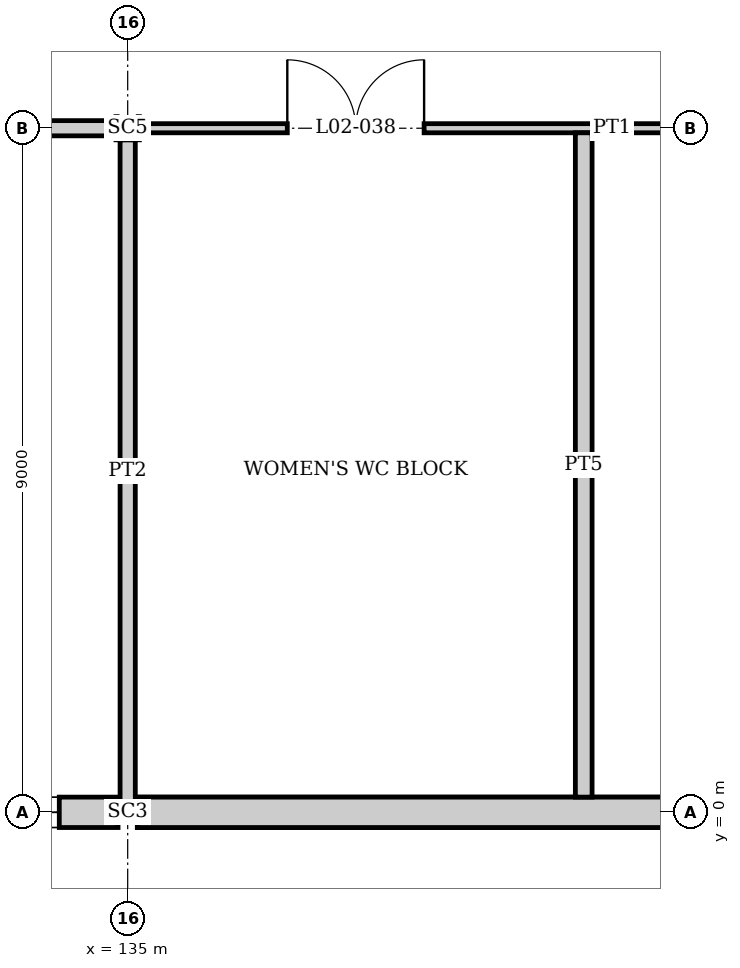
"""IFC4 building model, lengths in metres.
Left out: names, types, materials, properties, quantities, classifications, styles, units other than length and angle.
Written with IfcOpenShell. Run it as: python <this file> out.ifc"""

import sys

from ifc_helpers import new_model, si_unit, direction, frame, frame_2d, origin, origin_2d, place, context, subcontext, project, spatial, polyline, rectangle, i_section, outline, extrude, element, fill, save


model = new_model("IFC4")
c1 = context("Model", 3, precision=1e-05, world=origin(), true_north=direction((0.0, 1.0)))
c2 = subcontext(c1, "Body", "Model", "MODEL_VIEW")
j1 = project(units=[si_unit("LENGTHUNIT", "METRE"), si_unit("PLANEANGLEUNIT", "RADIAN")], contexts=[c1])
p1 = place(None, origin())
s1 = spatial("IfcSite", under=j1, at=p1, CompositionType="ELEMENT")
p2 = place(p1, origin())
s2 = spatial("IfcBuilding", under=s1, at=p2, CompositionType="ELEMENT")
p3 = place(p2, frame((0.0, 0.0, 10.5)))
s3 = spatial("IfcBuildingStorey", under=s2, at=p3, CompositionType="ELEMENT", Elevation=10.5)
p4 = place(p3, frame((135.0, 0.0, 0.0), z_axis=(0.0, 0.0, 1.0), x_axis=(0.0, 1.0, 0.0)))
e1 = element("IfcColumn", 1, at=p4, inside=s3, PredefinedType="COLUMN", context=c2, shape_type="SweptSolid", body=[
    extrude(i_section(OverallWidth=0.254, OverallDepth=0.254, WebThickness=0.009, FlangeThickness=0.014, at=origin_2d()), origin(), (0.0, 0.0, 1.0), 4.5),
])
p5 = place(p3, frame((135.0, 9.0, 0.0), z_axis=(0.0, 0.0, 1.0), x_axis=(0.0, 1.0, 0.0)))
e2 = element("IfcColumn", 2, at=p5, inside=s3, PredefinedType="COLUMN", context=c2, shape_type="SweptSolid", body=[
    extrude(i_section(OverallWidth=0.305, OverallDepth=0.308, WebThickness=0.01, FlangeThickness=0.015, at=origin_2d()), origin(), (0.0, 0.0, 1.0), 4.5),
])
p6 = place(p3, frame((126.0, 0.0, 0.0), z_axis=(0.0, 0.0, 1.0), x_axis=(1.0, 0.0, 0.0)))
e3 = element("IfcWall", 3, at=p6, inside=s3, PredefinedType="SOLIDWALL", context=c2, shape_type="SweptSolid", body=[
    extrude(rectangle(XDim=8.873, YDim=0.4, at=frame_2d((4.437, 0.0))), origin(), (0.0, 0.0, 1.0), 3.991),
])
p7 = place(p6, frame((0.9, 0.0, 1.5)))
e4 = element("IfcOpeningElement", 4, at=p7, cuts=e3, PredefinedType="OPENING", context=c2, shape_type="SweptSolid", body=[
    extrude(rectangle(XDim=2.7, YDim=1.5, at=frame_2d((1.35, 0.75))), frame((0.0, 0.21, 0.0), z_axis=(0.0, -1.0, 0.0), x_axis=(1.0, 0.0, 0.0)), (0.0, 0.0, 1.0), 0.42),
])
p8 = place(p6, frame((5.4, 0.0, 1.5)))
e5 = element("IfcOpeningElement", 5, at=p8, cuts=e3, PredefinedType="OPENING", context=c2, shape_type="SweptSolid", body=[
    extrude(rectangle(XDim=2.7, YDim=1.5, at=frame_2d((1.35, 0.75))), frame((0.0, 0.21, 0.0), z_axis=(0.0, -1.0, 0.0), x_axis=(1.0, 0.0, 0.0)), (0.0, 0.0, 1.0), 0.42),
])
p9 = place(p3, frame((135.127, 0.0, 0.0), z_axis=(0.0, 0.0, 1.0), x_axis=(1.0, 0.0, 0.0)))
e6 = element("IfcWall", 6, at=p9, inside=s3, PredefinedType="SOLIDWALL", context=c2, shape_type="SweptSolid", body=[
    extrude(outline(polyline([(8.746, 0.0), (0.0, 0.0), (0.0, 3.86), (8.698, 0.38), (8.746, 0.5), (8.746, 0.0)])), frame((0.0, 0.2, 0.0), z_axis=(0.0, -1.0, 0.0), x_axis=(1.0, 0.0, 0.0)), (0.0, 0.0, 1.0), 0.4),
])
p10 = place(p3, frame((135.127, 0.0, 0.0), z_axis=(0.0, 0.0, 1.0), x_axis=(1.0, 0.0, 0.0)))
e7 = element("IfcWall", 7, at=p10, inside=s3, PredefinedType="SOLIDWALL", context=c2, shape_type="SweptSolid", body=[
    extrude(outline(polyline([(8.746, 3.991), (8.746, 0.64), (0.371, 3.991), (8.746, 3.991)])), frame((0.0, 0.2, 0.0), z_axis=(0.0, -1.0, 0.0), x_axis=(1.0, 0.0, 0.0)), (0.0, 0.0, 1.0), 0.4),
])
p11 = place(p3, frame((126.0, 9.0, 0.0), z_axis=(0.0, 0.0, 1.0), x_axis=(1.0, 0.0, 0.0)))
e8 = element("IfcWall", 8, at=p11, inside=s3, PredefinedType="PARTITIONING", context=c2, shape_type="SweptSolid", body=[
    extrude(rectangle(XDim=8.846, YDim=0.2, at=frame_2d((4.423, 0.0))), origin(), (0.0, 0.0, 1.0), 2.414),
])
p12 = place(p11, frame((3.9, 0.0, 0.0)))
e9 = element("IfcOpeningElement", 9, at=p12, cuts=e8, PredefinedType="OPENING", context=c2, shape_type="SweptSolid", body=[
    extrude(rectangle(XDim=1.2, YDim=2.1, at=frame_2d((0.6, 1.05))), frame((0.0, 0.11, 0.0), z_axis=(0.0, -1.0, 0.0), x_axis=(1.0, 0.0, 0.0)), (0.0, 0.0, 1.0), 0.22),
])
p13 = place(p3, frame((135.154, 9.0, 0.0), z_axis=(0.0, 0.0, 1.0), x_axis=(1.0, 0.0, 0.0)))
e10 = element("IfcWall", 10, at=p13, inside=s3, PredefinedType="PARTITIONING", context=c2, shape_type="SweptSolid", body=[
    extrude(rectangle(XDim=8.692, YDim=0.12, at=frame_2d((4.346, 0.0))), origin(), (0.0, 0.0, 1.0), 2.414),
])
p14 = place(p13, frame((1.946, 0.0, 0.0)))
e11 = element("IfcOpeningElement", 11, at=p14, cuts=e10, PredefinedType="OPENING", context=c2, shape_type="SweptSolid", body=[
    extrude(rectangle(XDim=1.8, YDim=2.1, at=frame_2d((0.9, 1.05))), frame((0.0, 0.07, 0.0), z_axis=(0.0, -1.0, 0.0), x_axis=(1.0, 0.0, 0.0)), (0.0, 0.0, 1.0), 0.14),
])
p15 = place(p3, frame((135.0, 0.127, 0.0), z_axis=(0.0, 0.0, 1.0), x_axis=(0.0, 1.0, 0.0)))
e12 = element("IfcWall", 12, at=p15, inside=s3, PredefinedType="PARTITIONING", context=c2, shape_type="SweptSolid", body=[
    extrude(rectangle(XDim=8.719, YDim=0.2, at=frame_2d((4.359, 0.0))), origin(), (0.0, 0.0, 1.0), 3.998),
])
p16 = place(p3, frame((141.0, 0.2, 0.0), z_axis=(0.0, 0.0, 1.0), x_axis=(0.0, 1.0, 0.0)))
e13 = element("IfcWall", 13, at=p16, inside=s3, PredefinedType="PLUMBINGWALL", context=c2, shape_type="SweptSolid", body=[
    extrude(rectangle(XDim=8.74, YDim=0.22, at=frame_2d((4.37, 0.0))), origin(), (0.0, 0.0, 1.0), 3.991),
])
p17 = place(p8, origin())
e14 = element("IfcWindow", 14, at=p17, inside=s3, PartitioningType="SINGLE_PANEL", PredefinedType="WINDOW", context=c2, shape_type="SweptSolid", body=[
    extrude(rectangle(XDim=2.7, YDim=1.5, at=frame_2d((1.35, 0.75))), frame((0.0, 0.03, 0.0), z_axis=(0.0, -1.0, 0.0), x_axis=(1.0, 0.0, 0.0)), (0.0, 0.0, 1.0), 0.06),
])
fill(e5, e14)
p18 = place(p14, origin())
e15 = element("IfcDoor", 15, at=p18, inside=s3, OperationType="DOUBLE_DOOR_SINGLE_SWING", PredefinedType="DOOR", context=c2, shape_type="SweptSolid", body=[
    extrude(rectangle(XDim=1.8, YDim=2.1, at=frame_2d((0.9, 1.05))), frame((0.0, 0.025, 0.0), z_axis=(0.0, -1.0, 0.0), x_axis=(1.0, 0.0, 0.0)), (0.0, 0.0, 1.0), 0.05),
])
fill(e11, e15)
save(model, sys.argv[1])
